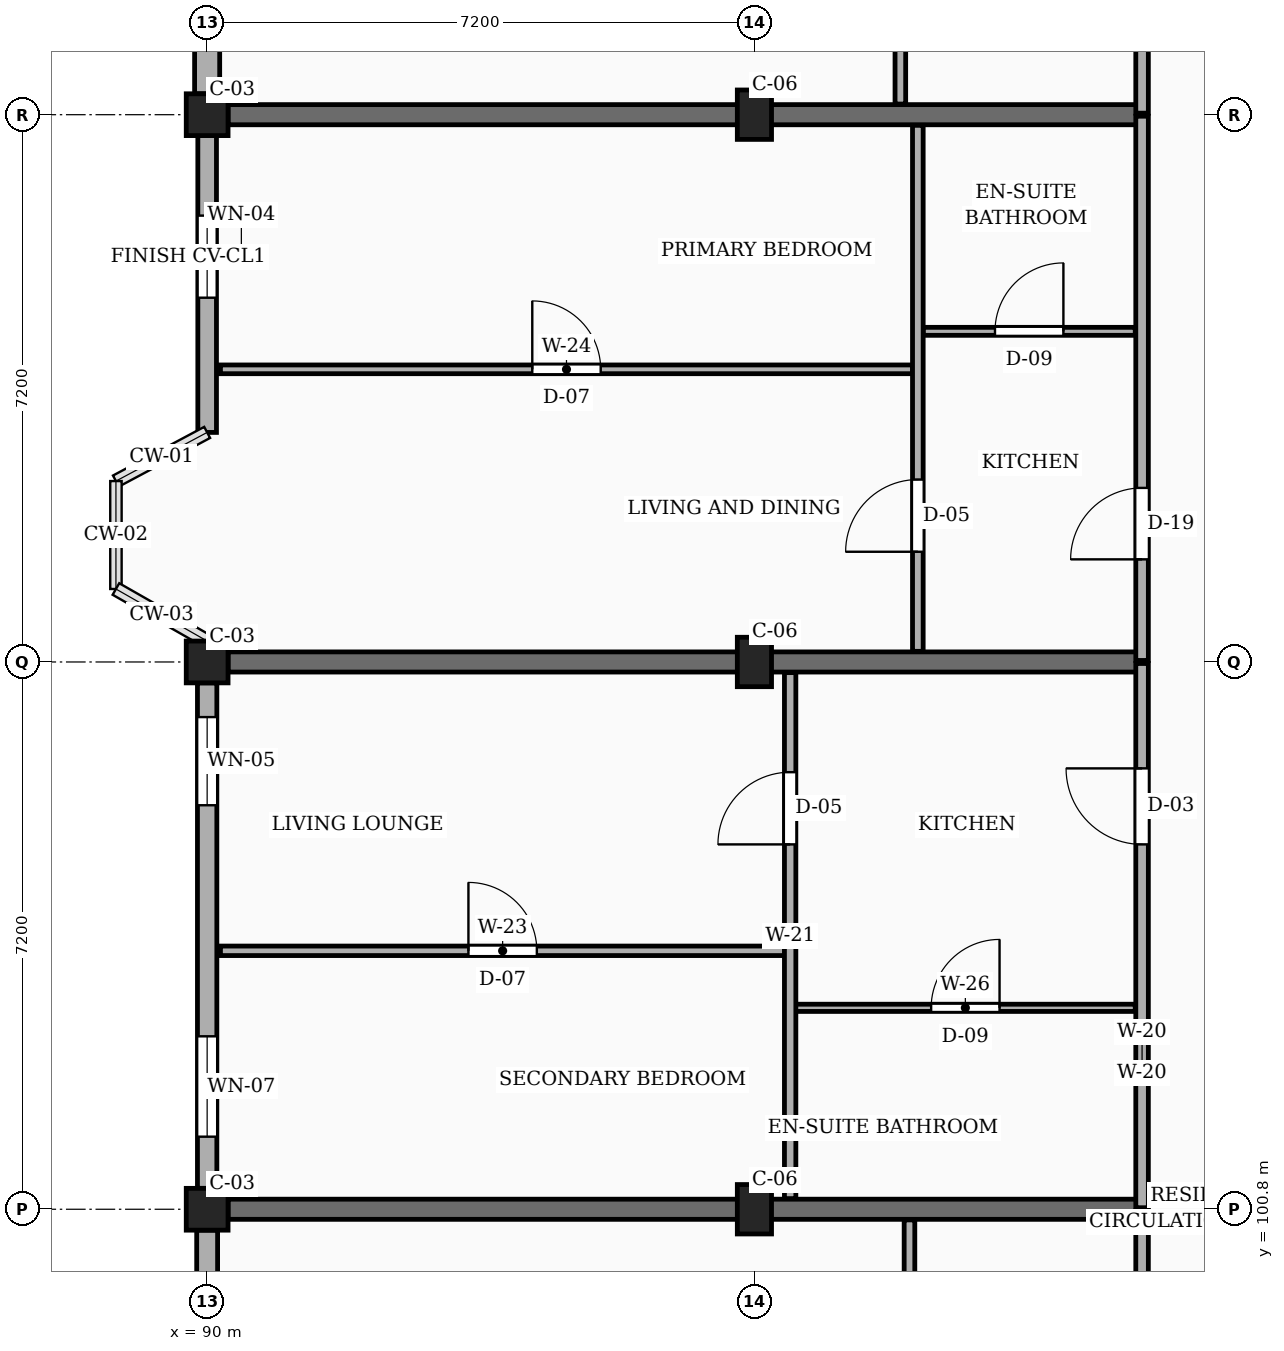
"""IFC4 building model, lengths in metres.
Left out: names, types, materials, properties, quantities, classifications, styles, units other than length and angle.
Written with IfcOpenShell. Run it as: python <this file> out.ifc"""

import sys

from ifc_helpers import new_model, si_unit, direction, frame, frame_2d, origin, origin_2d, place, context, subcontext, project, spatial, rectangle, extrude, element, fill, save


model = new_model("IFC4")
c1 = context("Model", 3, precision=1e-05, world=origin(), true_north=direction((0.0, 1.0)))
c2 = subcontext(c1, "Body", "Model", "MODEL_VIEW")
j1 = project(units=[si_unit("LENGTHUNIT", "METRE"), si_unit("PLANEANGLEUNIT", "RADIAN")], contexts=[c1])
p1 = place(None, origin())
s1 = spatial("IfcSite", under=j1, at=p1, CompositionType="ELEMENT")
p2 = place(p1, origin())
s2 = spatial("IfcBuilding", under=s1, at=p2, CompositionType="ELEMENT")
p3 = place(p2, frame((0.0, 0.0, 10.8)))
s3 = spatial("IfcBuildingStorey", under=s2, at=p3, CompositionType="ELEMENT", Elevation=10.8)
for number, where, z_axis, x_axis in (
    (1, (90.0, 100.8, 0.0), (0.0, 0.0, 1.0), (1.0, 0.0, 0.0)),
    (2, (90.0, 108.0, 0.0), (0.0, 0.0, 1.0), (1.0, 0.0, 0.0)),
    (3, (90.0, 115.2, 0.0), (0.0, 0.0, 1.0), (1.0, 0.0, 0.0)),
):
    element("IfcColumn", number, at=place(p3, frame(where, z_axis=z_axis, x_axis=x_axis)), inside=s3, PredefinedType="COLUMN", context=c2, shape_type="SweptSolid", body=[
        extrude(rectangle(XDim=0.55, YDim=0.55, at=origin_2d()), origin(), (0.0, 0.0, 1.0), 3.15),
    ])
for number, where, z_axis, x_axis in (
    (4, (97.2, 100.8, 0.0), (0.0, 0.0, 1.0), (1.0, 0.0, 0.0)),
    (5, (97.2, 108.0, 0.0), (0.0, 0.0, 1.0), (1.0, 0.0, 0.0)),
    (6, (97.2, 115.2, 0.0), (0.0, 0.0, 1.0), (1.0, 0.0, 0.0)),
):
    element("IfcColumn", number, at=place(p3, frame(where, z_axis=z_axis, x_axis=x_axis)), inside=s3, PredefinedType="COLUMN", context=c2, shape_type="SweptSolid", body=[
        extrude(rectangle(XDim=0.45, YDim=0.65, at=origin_2d()), origin(), (0.0, 0.0, 1.0), 3.15),
    ])
for number, where, z_axis, x_axis in (
    (7, (90.275, 100.8, 0.0), (0.0, 0.0, 1.0), (1.0, 0.0, 0.0)),
    (8, (90.275, 108.0, 0.0), (0.0, 0.0, 1.0), (1.0, 0.0, 0.0)),
    (9, (90.275, 115.2, 0.0), (0.0, 0.0, 1.0), (1.0, 0.0, 0.0)),
):
    element("IfcWall", number, at=place(p3, frame(where, z_axis=z_axis, x_axis=x_axis)), inside=s3, PredefinedType="SOLIDWALL", context=c2, shape_type="SweptSolid", body=[
        extrude(rectangle(XDim=12.025, YDim=0.265, at=frame_2d((6.013, 0.0))), origin(), (0.0, 0.0, 1.0), 2.19),
    ])
p4 = place(p3, frame((90.0, 122.125, 0.0), z_axis=(0.0, 0.0, 1.0), x_axis=(0.0, -1.0, 0.0)))
e10 = element("IfcWall", 10, at=p4, inside=s3, PredefinedType="SOLIDWALL", context=c2, shape_type="SweptSolid", body=[
    extrude(rectangle(XDim=6.65, YDim=0.33, at=frame_2d((3.325, 0.0))), origin(), (0.0, 0.0, 1.0), 2.46),
])
p5 = place(p4, frame((0.45, 0.0, 0.78)))
e11 = element("IfcOpeningElement", 11, at=p5, cuts=e10, PredefinedType="OPENING", context=c2, shape_type="SweptSolid", body=[
    extrude(rectangle(XDim=0.92, YDim=1.15, at=frame_2d((0.46, 0.575))), frame((0.0, 0.175, 0.0), z_axis=(0.0, -1.0, 0.0), x_axis=(1.0, 0.0, 0.0)), (0.0, 0.0, 1.0), 0.35),
])
p6 = place(p4, frame((4.65, 0.0, 0.78)))
e12 = element("IfcOpeningElement", 12, at=p6, cuts=e10, PredefinedType="OPENING", context=c2, shape_type="SweptSolid", body=[
    extrude(rectangle(XDim=1.08, YDim=1.15, at=frame_2d((0.54, 0.575))), frame((0.0, 0.175, 0.0), z_axis=(0.0, -1.0, 0.0), x_axis=(1.0, 0.0, 0.0)), (0.0, 0.0, 1.0), 0.35),
])
p7 = place(p3, frame((90.0, 114.925, 0.0), z_axis=(0.0, 0.0, 1.0), x_axis=(0.0, -1.0, 0.0)))
e13 = element("IfcWall", 13, at=p7, inside=s3, PredefinedType="SOLIDWALL", context=c2, shape_type="SweptSolid", body=[
    extrude(rectangle(XDim=3.905, YDim=0.245, at=frame_2d((1.953, 0.0))), origin(), (0.0, 0.0, 1.0), 2.46),
])
p8 = place(p7, frame((1.052, 0.0, 0.78)))
e14 = element("IfcOpeningElement", 14, at=p8, cuts=e13, PredefinedType="OPENING", context=c2, shape_type="SweptSolid", body=[
    extrude(rectangle(XDim=1.08, YDim=1.15, at=frame_2d((0.54, 0.575))), frame((0.0, 0.133, 0.0), z_axis=(0.0, -1.0, 0.0), x_axis=(1.0, 0.0, 0.0)), (0.0, 0.0, 1.0), 0.265),
])
p9 = place(p3, frame((90.0, 107.725, 0.0), z_axis=(0.0, 0.0, 1.0), x_axis=(0.0, -1.0, 0.0)))
e15 = element("IfcWall", 15, at=p9, inside=s3, PredefinedType="SOLIDWALL", context=c2, shape_type="SweptSolid", body=[
    extrude(rectangle(XDim=6.65, YDim=0.255, at=frame_2d((3.325, 0.0))), origin(), (0.0, 0.0, 1.0), 2.46),
])
p10 = place(p9, frame((0.45, 0.0, 0.78)))
e16 = element("IfcOpeningElement", 16, at=p10, cuts=e15, PredefinedType="OPENING", context=c2, shape_type="SweptSolid", body=[
    extrude(rectangle(XDim=1.16, YDim=1.15, at=frame_2d((0.58, 0.575))), frame((0.0, 0.137, 0.0), z_axis=(0.0, -1.0, 0.0), x_axis=(1.0, 0.0, 0.0)), (0.0, 0.0, 1.0), 0.275),
])
p11 = place(p9, frame((4.65, 0.0, 0.78)))
e17 = element("IfcOpeningElement", 17, at=p11, cuts=e15, PredefinedType="OPENING", context=c2, shape_type="SweptSolid", body=[
    extrude(rectangle(XDim=1.32, YDim=1.15, at=frame_2d((0.66, 0.575))), frame((0.0, 0.137, 0.0), z_axis=(0.0, -1.0, 0.0), x_axis=(1.0, 0.0, 0.0)), (0.0, 0.0, 1.0), 0.275),
])
p12 = place(p3, frame((90.0, 100.525, 0.0), z_axis=(0.0, 0.0, 1.0), x_axis=(0.0, -1.0, 0.0)))
e18 = element("IfcWall", 18, at=p12, inside=s3, PredefinedType="SOLIDWALL", context=c2, shape_type="SweptSolid", body=[
    extrude(rectangle(XDim=3.905, YDim=0.275, at=frame_2d((1.952, 0.0))), origin(), (0.0, 0.0, 1.0), 2.46),
])
p13 = place(p12, frame((0.883, 0.0, 0.78)))
e19 = element("IfcOpeningElement", 19, at=p13, cuts=e18, PredefinedType="OPENING", context=c2, shape_type="SweptSolid", body=[
    extrude(rectangle(XDim=1.32, YDim=1.15, at=frame_2d((0.66, 0.575))), frame((0.0, 0.147, 0.0), z_axis=(0.0, -1.0, 0.0), x_axis=(1.0, 0.0, 0.0)), (0.0, 0.0, 1.0), 0.295),
])
p14 = place(p3, frame((102.3, 93.62, 0.0), z_axis=(0.0, 0.0, 1.0), x_axis=(0.0, 1.0, 0.0)))
e20 = element("IfcWall", 20, at=p14, inside=s3, PredefinedType="PARTITIONING", context=c2, shape_type="SweptSolid", body=[
    extrude(rectangle(XDim=7.16, YDim=0.165, at=frame_2d((3.58, 0.0))), origin(), (0.0, 0.0, 1.0), 2.325),
])
p15 = place(p14, frame((1.33, 0.0, 0.0)))
e21 = element("IfcOpeningElement", 21, at=p15, cuts=e20, PredefinedType="OPENING", context=c2, shape_type="SweptSolid", body=[
    extrude(rectangle(XDim=1.14, YDim=2.18, at=frame_2d((0.57, 1.09))), frame((0.0, 0.093, 0.0), z_axis=(0.0, -1.0, 0.0), x_axis=(1.0, 0.0, 0.0)), (0.0, 0.0, 1.0), 0.185),
])
p16 = place(p3, frame((102.3, 100.82, 0.0), z_axis=(0.0, 0.0, 1.0), x_axis=(0.0, 1.0, 0.0)))
e22 = element("IfcWall", 22, at=p16, inside=s3, PredefinedType="PARTITIONING", context=c2, shape_type="SweptSolid", body=[
    extrude(rectangle(XDim=7.16, YDim=0.165, at=frame_2d((3.58, 0.0))), origin(), (0.0, 0.0, 1.0), 2.325),
])
p17 = place(p16, frame((4.78, 0.0, 0.0)))
e23 = element("IfcOpeningElement", 23, at=p17, cuts=e22, PredefinedType="OPENING", context=c2, shape_type="SweptSolid", body=[
    extrude(rectangle(XDim=1.0, YDim=2.15, at=frame_2d((0.5, 1.075))), frame((0.0, 0.093, 0.0), z_axis=(0.0, -1.0, 0.0), x_axis=(1.0, 0.0, 0.0)), (0.0, 0.0, 1.0), 0.185),
])
p18 = place(p3, frame((102.3, 108.02, 0.0), z_axis=(0.0, 0.0, 1.0), x_axis=(0.0, 1.0, 0.0)))
e24 = element("IfcWall", 24, at=p18, inside=s3, PredefinedType="PARTITIONING", context=c2, shape_type="SweptSolid", body=[
    extrude(rectangle(XDim=7.16, YDim=0.165, at=frame_2d((3.58, 0.0))), origin(), (0.0, 0.0, 1.0), 2.325),
])
p19 = place(p18, frame((1.33, 0.0, 0.0)))
e25 = element("IfcOpeningElement", 25, at=p19, cuts=e24, PredefinedType="OPENING", context=c2, shape_type="SweptSolid", body=[
    extrude(rectangle(XDim=0.94, YDim=2.12, at=frame_2d((0.47, 1.06))), frame((0.0, 0.093, 0.0), z_axis=(0.0, -1.0, 0.0), x_axis=(1.0, 0.0, 0.0)), (0.0, 0.0, 1.0), 0.185),
])
p20 = place(p3, frame((102.3, 115.22, 0.0), z_axis=(0.0, 0.0, 1.0), x_axis=(0.0, 1.0, 0.0)))
e26 = element("IfcWall", 26, at=p20, inside=s3, PredefinedType="PARTITIONING", context=c2, shape_type="SweptSolid", body=[
    extrude(rectangle(XDim=7.16, YDim=0.165, at=frame_2d((3.58, 0.0))), origin(), (0.0, 0.0, 1.0), 2.325),
])
p21 = place(p20, frame((1.33, 0.0, 0.0)))
e27 = element("IfcOpeningElement", 27, at=p21, cuts=e26, PredefinedType="OPENING", context=c2, shape_type="SweptSolid", body=[
    extrude(rectangle(XDim=1.14, YDim=2.18, at=frame_2d((0.57, 1.09))), frame((0.0, 0.093, 0.0), z_axis=(0.0, -1.0, 0.0), x_axis=(1.0, 0.0, 0.0)), (0.0, 0.0, 1.0), 0.185),
])
p22 = place(p3, frame((99.24, 93.74, 0.0), z_axis=(0.0, 0.0, 1.0), x_axis=(0.0, 1.0, 0.0)))
e28 = element("IfcWall", 28, at=p22, inside=s3, PredefinedType="PARTITIONING", context=c2, shape_type="SweptSolid", body=[
    extrude(rectangle(XDim=6.92, YDim=0.14, at=frame_2d((3.46, 0.0))), origin(), (0.0, 0.0, 1.0), 2.325),
])
p23 = place(p22, frame((1.31, 0.0, 0.0)))
e29 = element("IfcOpeningElement", 29, at=p23, cuts=e28, PredefinedType="OPENING", context=c2, shape_type="SweptSolid", body=[
    extrude(rectangle(XDim=0.92, YDim=2.1, at=frame_2d((0.46, 1.05))), frame((0.0, 0.08, 0.0), z_axis=(0.0, -1.0, 0.0), x_axis=(1.0, 0.0, 0.0)), (0.0, 0.0, 1.0), 0.16),
])
p24 = place(p3, frame((90.175, 104.2, 0.0), z_axis=(0.0, 0.0, 1.0), x_axis=(1.0, 0.0, 0.0)))
e30 = element("IfcWall", 30, at=p24, inside=s3, PredefinedType="PARTITIONING", context=c2, shape_type="SweptSolid", body=[
    extrude(rectangle(XDim=7.425, YDim=0.125, at=frame_2d((3.712, 0.0))), origin(), (0.0, 0.0, 1.0), 2.325),
])
p25 = place(p24, frame((3.262, 0.0, 0.0)))
e31 = element("IfcOpeningElement", 31, at=p25, cuts=e30, PredefinedType="OPENING", context=c2, shape_type="SweptSolid", body=[
    extrude(rectangle(XDim=0.9, YDim=2.1, at=frame_2d((0.45, 1.05))), frame((0.0, 0.073, 0.0), z_axis=(0.0, -1.0, 0.0), x_axis=(1.0, 0.0, 0.0)), (0.0, 0.0, 1.0), 0.145),
])
p26 = place(p3, frame((97.74, 103.45, 0.0), z_axis=(0.0, 0.0, 1.0), x_axis=(1.0, 0.0, 0.0)))
e32 = element("IfcWall", 32, at=p26, inside=s3, PredefinedType="PARTITIONING", context=c2, shape_type="SweptSolid", body=[
    extrude(rectangle(XDim=4.47, YDim=0.095, at=frame_2d((2.235, 0.0))), origin(), (0.0, 0.0, 1.0), 2.325),
])
p27 = place(p26, frame((1.785, 0.0, 0.0)))
e33 = element("IfcOpeningElement", 33, at=p27, cuts=e32, PredefinedType="OPENING", context=c2, shape_type="SweptSolid", body=[
    extrude(rectangle(XDim=0.9, YDim=2.05, at=frame_2d((0.45, 1.025))), frame((0.0, 0.058, 0.0), z_axis=(0.0, -1.0, 0.0), x_axis=(1.0, 0.0, 0.0)), (0.0, 0.0, 1.0), 0.115),
])
p28 = place(p3, frame((97.67, 100.94, 0.0), z_axis=(0.0, 0.0, 1.0), x_axis=(0.0, 1.0, 0.0)))
e34 = element("IfcWall", 34, at=p28, inside=s3, PredefinedType="PARTITIONING", context=c2, shape_type="SweptSolid", body=[
    extrude(rectangle(XDim=6.92, YDim=0.15, at=frame_2d((3.46, 0.0))), origin(), (0.0, 0.0, 1.0), 2.325),
])
p29 = place(p28, frame((4.66, 0.0, 0.0)))
e35 = element("IfcOpeningElement", 35, at=p29, cuts=e34, PredefinedType="OPENING", context=c2, shape_type="SweptSolid", body=[
    extrude(rectangle(XDim=0.95, YDim=2.1, at=frame_2d((0.475, 1.05))), frame((0.0, 0.085, 0.0), z_axis=(0.0, -1.0, 0.0), x_axis=(1.0, 0.0, 0.0)), (0.0, 0.0, 1.0), 0.17),
])
p30 = place(p3, frame((90.175, 111.85, 0.0), z_axis=(0.0, 0.0, 1.0), x_axis=(1.0, 0.0, 0.0)))
e36 = element("IfcWall", 36, at=p30, inside=s3, PredefinedType="PARTITIONING", context=c2, shape_type="SweptSolid", body=[
    extrude(rectangle(XDim=9.105, YDim=0.115, at=frame_2d((4.552, 0.0))), origin(), (0.0, 0.0, 1.0), 2.325),
])
p31 = place(p30, frame((4.103, 0.0, 0.0)))
e37 = element("IfcOpeningElement", 37, at=p31, cuts=e36, PredefinedType="OPENING", context=c2, shape_type="SweptSolid", body=[
    extrude(rectangle(XDim=0.9, YDim=2.1, at=frame_2d((0.45, 1.05))), frame((0.0, 0.067, 0.0), z_axis=(0.0, -1.0, 0.0), x_axis=(1.0, 0.0, 0.0)), (0.0, 0.0, 1.0), 0.135),
])
p32 = place(p3, frame((99.42, 112.35, 0.0), z_axis=(0.0, 0.0, 1.0), x_axis=(1.0, 0.0, 0.0)))
e38 = element("IfcWall", 38, at=p32, inside=s3, PredefinedType="PARTITIONING", context=c2, shape_type="SweptSolid", body=[
    extrude(rectangle(XDim=2.79, YDim=0.105, at=frame_2d((1.395, 0.0))), origin(), (0.0, 0.0, 1.0), 2.325),
])
p33 = place(p32, frame((0.945, 0.0, 0.0)))
e39 = element("IfcOpeningElement", 39, at=p33, cuts=e38, PredefinedType="OPENING", context=c2, shape_type="SweptSolid", body=[
    extrude(rectangle(XDim=0.9, YDim=2.05, at=frame_2d((0.45, 1.025))), frame((0.0, 0.062, 0.0), z_axis=(0.0, -1.0, 0.0), x_axis=(1.0, 0.0, 0.0)), (0.0, 0.0, 1.0), 0.125),
])
p34 = place(p3, frame((99.35, 108.14, 0.0), z_axis=(0.0, 0.0, 1.0), x_axis=(0.0, 1.0, 0.0)))
e40 = element("IfcWall", 40, at=p34, inside=s3, PredefinedType="PARTITIONING", context=c2, shape_type="SweptSolid", body=[
    extrude(rectangle(XDim=6.92, YDim=0.14, at=frame_2d((3.46, 0.0))), origin(), (0.0, 0.0, 1.0), 2.325),
])
p35 = place(p34, frame((1.31, 0.0, 0.0)))
e41 = element("IfcOpeningElement", 41, at=p35, cuts=e40, PredefinedType="OPENING", context=c2, shape_type="SweptSolid", body=[
    extrude(rectangle(XDim=0.95, YDim=2.1, at=frame_2d((0.475, 1.05))), frame((0.0, 0.08, 0.0), z_axis=(0.0, -1.0, 0.0), x_axis=(1.0, 0.0, 0.0)), (0.0, 0.0, 1.0), 0.16),
])
p36 = place(p3, frame((99.12, 115.34, 0.0), z_axis=(0.0, 0.0, 1.0), x_axis=(0.0, 1.0, 0.0)))
e42 = element("IfcWall", 42, at=p36, inside=s3, PredefinedType="PARTITIONING", context=c2, shape_type="SweptSolid", body=[
    extrude(rectangle(XDim=6.92, YDim=0.14, at=frame_2d((3.46, 0.0))), origin(), (0.0, 0.0, 1.0), 2.325),
])
p37 = place(p36, frame((1.31, 0.0, 0.0)))
e43 = element("IfcOpeningElement", 43, at=p37, cuts=e42, PredefinedType="OPENING", context=c2, shape_type="SweptSolid", body=[
    extrude(rectangle(XDim=0.92, YDim=2.1, at=frame_2d((0.46, 1.05))), frame((0.0, 0.08, 0.0), z_axis=(0.0, -1.0, 0.0), x_axis=(1.0, 0.0, 0.0)), (0.0, 0.0, 1.0), 0.16),
])
p38 = place(p8, origin())
e44 = element("IfcWindow", 44, at=p38, inside=s3, PartitioningType="SINGLE_PANEL", PredefinedType="WINDOW", context=c2, shape_type="SweptSolid", body=[
    extrude(rectangle(XDim=1.08, YDim=1.15, at=frame_2d((0.54, 0.575))), frame((0.0, 0.03, 0.0), z_axis=(0.0, -1.0, 0.0), x_axis=(1.0, 0.0, 0.0)), (0.0, 0.0, 1.0), 0.06),
])
fill(e14, e44)
p39 = place(p10, origin())
e45 = element("IfcWindow", 45, at=p39, inside=s3, PartitioningType="SINGLE_PANEL", PredefinedType="WINDOW", context=c2, shape_type="SweptSolid", body=[
    extrude(rectangle(XDim=1.16, YDim=1.15, at=frame_2d((0.58, 0.575))), frame((0.0, 0.03, 0.0), z_axis=(0.0, -1.0, 0.0), x_axis=(1.0, 0.0, 0.0)), (0.0, 0.0, 1.0), 0.06),
])
fill(e16, e45)
p40 = place(p11, origin())
e46 = element("IfcWindow", 46, at=p40, inside=s3, PartitioningType="SINGLE_PANEL", PredefinedType="WINDOW", context=c2, shape_type="SweptSolid", body=[
    extrude(rectangle(XDim=1.32, YDim=1.15, at=frame_2d((0.66, 0.575))), frame((0.0, 0.03, 0.0), z_axis=(0.0, -1.0, 0.0), x_axis=(1.0, 0.0, 0.0)), (0.0, 0.0, 1.0), 0.06),
])
fill(e17, e46)
p41 = place(p17, origin())
e47 = element("IfcDoor", 47, at=p41, inside=s3, OperationType="SINGLE_SWING_RIGHT", PredefinedType="DOOR", context=c2, shape_type="SweptSolid", body=[
    extrude(rectangle(XDim=1.0, YDim=2.15, at=frame_2d((0.5, 1.075))), frame((0.0, 0.025, 0.0), z_axis=(0.0, -1.0, 0.0), x_axis=(1.0, 0.0, 0.0)), (0.0, 0.0, 1.0), 0.05),
])
fill(e23, e47)
p42 = place(p19, origin())
e48 = element("IfcDoor", 48, at=p42, inside=s3, OperationType="SINGLE_SWING_LEFT", PredefinedType="DOOR", context=c2, shape_type="SweptSolid", body=[
    extrude(rectangle(XDim=0.94, YDim=2.12, at=frame_2d((0.47, 1.06))), frame((0.0, 0.025, 0.0), z_axis=(0.0, -1.0, 0.0), x_axis=(1.0, 0.0, 0.0)), (0.0, 0.0, 1.0), 0.05),
])
fill(e25, e48)
p43 = place(p25, origin())
e49 = element("IfcDoor", 49, at=p43, inside=s3, OperationType="SINGLE_SWING_LEFT", PredefinedType="DOOR", context=c2, shape_type="SweptSolid", body=[
    extrude(rectangle(XDim=0.9, YDim=2.1, at=frame_2d((0.45, 1.05))), frame((0.0, 0.025, 0.0), z_axis=(0.0, -1.0, 0.0), x_axis=(1.0, 0.0, 0.0)), (0.0, 0.0, 1.0), 0.05),
])
fill(e31, e49)
p44 = place(p27, origin())
e50 = element("IfcDoor", 50, at=p44, inside=s3, OperationType="SINGLE_SWING_RIGHT", PredefinedType="DOOR", context=c2, shape_type="SweptSolid", body=[
    extrude(rectangle(XDim=0.9, YDim=2.05, at=frame_2d((0.45, 1.025))), frame((0.0, 0.025, 0.0), z_axis=(0.0, -1.0, 0.0), x_axis=(1.0, 0.0, 0.0)), (0.0, 0.0, 1.0), 0.05),
])
fill(e33, e50)
p45 = place(p29, origin())
e51 = element("IfcDoor", 51, at=p45, inside=s3, OperationType="SINGLE_SWING_LEFT", PredefinedType="DOOR", context=c2, shape_type="SweptSolid", body=[
    extrude(rectangle(XDim=0.95, YDim=2.1, at=frame_2d((0.475, 1.05))), frame((0.0, 0.025, 0.0), z_axis=(0.0, -1.0, 0.0), x_axis=(1.0, 0.0, 0.0)), (0.0, 0.0, 1.0), 0.05),
])
fill(e35, e51)
p46 = place(p31, origin())
e52 = element("IfcDoor", 52, at=p46, inside=s3, OperationType="SINGLE_SWING_LEFT", PredefinedType="DOOR", context=c2, shape_type="SweptSolid", body=[
    extrude(rectangle(XDim=0.9, YDim=2.1, at=frame_2d((0.45, 1.05))), frame((0.0, 0.025, 0.0), z_axis=(0.0, -1.0, 0.0), x_axis=(1.0, 0.0, 0.0)), (0.0, 0.0, 1.0), 0.05),
])
fill(e37, e52)
p47 = place(p33, origin())
e53 = element("IfcDoor", 53, at=p47, inside=s3, OperationType="SINGLE_SWING_RIGHT", PredefinedType="DOOR", context=c2, shape_type="SweptSolid", body=[
    extrude(rectangle(XDim=0.9, YDim=2.05, at=frame_2d((0.45, 1.025))), frame((0.0, 0.025, 0.0), z_axis=(0.0, -1.0, 0.0), x_axis=(1.0, 0.0, 0.0)), (0.0, 0.0, 1.0), 0.05),
])
fill(e39, e53)
p48 = place(p35, origin())
e54 = element("IfcDoor", 54, at=p48, inside=s3, OperationType="SINGLE_SWING_LEFT", PredefinedType="DOOR", context=c2, shape_type="SweptSolid", body=[
    extrude(rectangle(XDim=0.95, YDim=2.1, at=frame_2d((0.475, 1.05))), frame((0.0, 0.025, 0.0), z_axis=(0.0, -1.0, 0.0), x_axis=(1.0, 0.0, 0.0)), (0.0, 0.0, 1.0), 0.05),
])
fill(e41, e54)
save(model, sys.argv[1])
